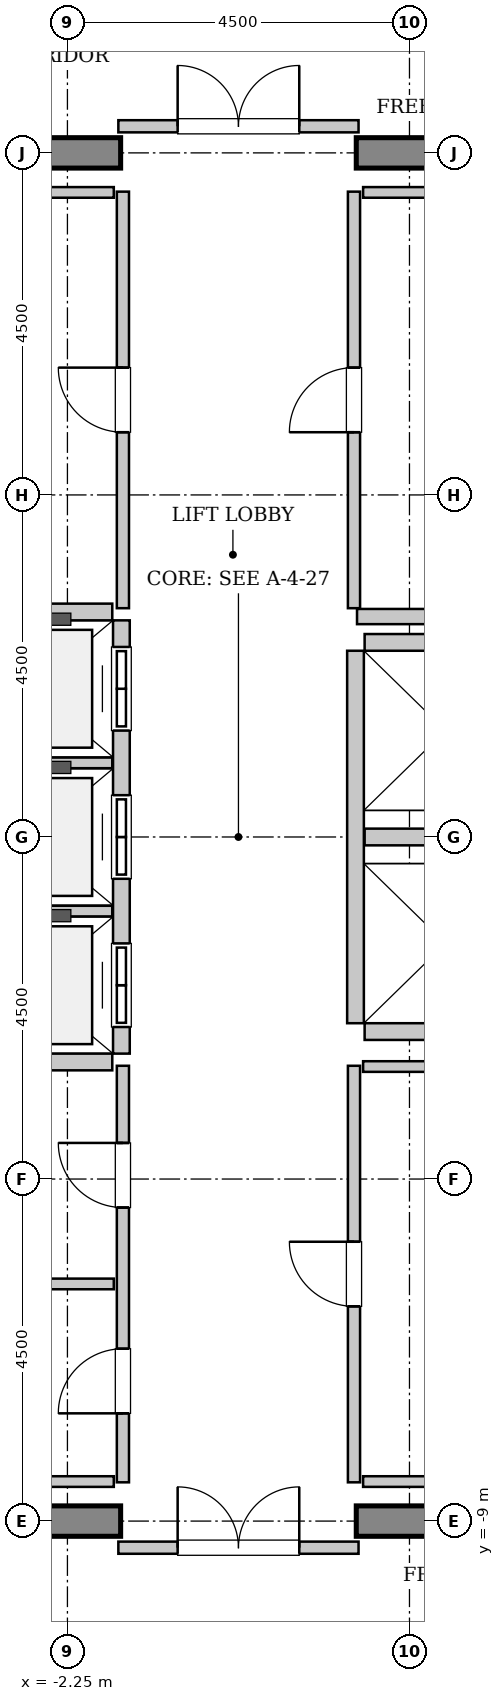
"""IFC4 building model, lengths in metres.
Left out: names, types, materials, properties, quantities, classifications, styles, units other than length and angle.
Written with IfcOpenShell. Run it as: python <this file> out.ifc"""

import sys

from ifc_helpers import new_model, si_unit, direction, frame, frame_2d, origin, place, context, subcontext, project, spatial, rectangle, extrude, source, transform, mapped, element, fill, save


model = new_model("IFC4")
c1 = context("Model", 3, precision=1e-05, world=origin(), true_north=direction((0.0, 1.0)))
c2 = subcontext(c1, "Body", "Model", "MODEL_VIEW")
j1 = project(units=[si_unit("LENGTHUNIT", "METRE"), si_unit("PLANEANGLEUNIT", "RADIAN")], contexts=[c1])
p1 = place(None, origin())
s1 = spatial("IfcSite", under=j1, at=p1, CompositionType="ELEMENT")
p2 = place(p1, origin())
s2 = spatial("IfcBuilding", under=s1, at=p2, CompositionType="ELEMENT")
p3 = place(p2, frame((0.0, 0.0, 326.2)))
s3 = spatial("IfcBuildingStorey", under=s2, at=p3, CompositionType="ELEMENT", Elevation=326.2)
m1 = source(origin(), c2, "Body", "SweptSolid", [
    extrude(rectangle(XDim=9.9, YDim=0.4, at=frame_2d((4.95, 0.0))), origin(), (0.0, 0.0, 1.0), 3.8),
])
for number, where, z_axis, x_axis in (
    (1, (-11.45, 9.0, 0.0), (0.0, 0.0, 1.0), (1.0, 0.0, 0.0)),
    (2, (1.55, 9.0, 0.0), (0.0, 0.0, 1.0), (1.0, 0.0, 0.0)),
    (3, (-11.45, -9.0, 0.0), (0.0, 0.0, 1.0), (1.0, 0.0, 0.0)),
    (4, (1.55, -9.0, 0.0), (0.0, 0.0, 1.0), (1.0, 0.0, 0.0)),
):
    element("IfcWall", number, at=place(p3, frame(where, z_axis=z_axis, x_axis=x_axis)), inside=s3, PredefinedType="SHEAR", context=c2, shape_type="MappedRepresentation", body=[
        mapped(m1, transform((0.0, 0.0, 0.0), x_axis=(1.0, 0.0, 0.0), y_axis=(0.0, 1.0, 0.0), z_axis=(0.0, 0.0, 1.0), scale=1.0)),
    ])
m2 = source(origin(), c2, "Body", "SweptSolid", [
    extrude(rectangle(XDim=5.7, YDim=0.22, at=frame_2d((2.85, 0.0))), origin(), (0.0, 0.0, 1.0), 3.535),
])
p4 = place(p3, frame((-1.54, -2.85, 0.0), z_axis=(0.0, 0.0, 1.0), x_axis=(0.0, 1.0, 0.0)))
e5 = element("IfcWall", 5, at=p4, inside=s3, PredefinedType="SOLIDWALL", context=c2, shape_type="MappedRepresentation", body=[
    mapped(m2, transform((0.0, 0.0, 0.0), x_axis=(1.0, 0.0, 0.0), y_axis=(0.0, 1.0, 0.0), z_axis=(0.0, 0.0, 1.0), scale=1.0)),
])
p5 = place(p4, frame((0.35, 0.0, 0.0)))
e6 = element("IfcOpeningElement", 6, at=p5, cuts=e5, PredefinedType="OPENING", context=c2, shape_type="SweptSolid", body=[
    extrude(rectangle(XDim=1.1, YDim=2.2, at=frame_2d((0.55, 1.1))), frame((0.0, 0.12, 0.0), z_axis=(0.0, -1.0, 0.0), x_axis=(1.0, 0.0, 0.0)), (0.0, 0.0, 1.0), 0.24),
])
p6 = place(p4, frame((2.3, 0.0, 0.0)))
e7 = element("IfcOpeningElement", 7, at=p6, cuts=e5, PredefinedType="OPENING", context=c2, shape_type="SweptSolid", body=[
    extrude(rectangle(XDim=1.1, YDim=2.2, at=frame_2d((0.55, 1.1))), frame((0.0, 0.12, 0.0), z_axis=(0.0, -1.0, 0.0), x_axis=(1.0, 0.0, 0.0)), (0.0, 0.0, 1.0), 0.24),
])
p7 = place(p4, frame((4.25, 0.0, 0.0)))
e8 = element("IfcOpeningElement", 8, at=p7, cuts=e5, PredefinedType="OPENING", context=c2, shape_type="SweptSolid", body=[
    extrude(rectangle(XDim=1.1, YDim=2.2, at=frame_2d((0.55, 1.1))), frame((0.0, 0.12, 0.0), z_axis=(0.0, -1.0, 0.0), x_axis=(1.0, 0.0, 0.0)), (0.0, 0.0, 1.0), 0.24),
])
m3 = source(origin(), c2, "Body", "SweptSolid", [
    extrude(rectangle(XDim=2.13, YDim=0.22, at=frame_2d((1.065, 0.0))), origin(), (0.0, 0.0, 1.0), 3.535),
])
p8 = place(p3, frame((-3.79, -2.96, 0.0), z_axis=(0.0, 0.0, 1.0), x_axis=(1.0, 0.0, 0.0)))
e9 = element("IfcWall", 9, at=p8, inside=s3, PredefinedType="SOLIDWALL", context=c2, shape_type="MappedRepresentation", body=[
    mapped(m3, transform((0.0, 0.0, 0.0), x_axis=(1.0, 0.0, 0.0), y_axis=(0.0, 1.0, 0.0), z_axis=(0.0, 0.0, 1.0), scale=1.0)),
])
m4 = source(origin(), c2, "Body", "SweptSolid", [
    extrude(rectangle(XDim=2.13, YDim=0.14, at=frame_2d((1.065, 0.0))), origin(), (0.0, 0.0, 1.0), 3.535),
])
for number, where, z_axis, x_axis in (
    (10, (-3.79, -0.975, 0.0), (0.0, 0.0, 1.0), (1.0, 0.0, 0.0)),
    (11, (-3.79, 0.975, 0.0), (0.0, 0.0, 1.0), (1.0, 0.0, 0.0)),
):
    element("IfcWall", number, at=place(p3, frame(where, z_axis=z_axis, x_axis=x_axis)), inside=s3, PredefinedType="PARTITIONING", context=c2, shape_type="MappedRepresentation", body=[
        mapped(m4, transform((0.0, 0.0, 0.0), x_axis=(1.0, 0.0, 0.0), y_axis=(0.0, 1.0, 0.0), z_axis=(0.0, 0.0, 1.0), scale=1.0)),
    ])
p9 = place(p3, frame((-1.66, 2.96, 0.0), z_axis=(0.0, 0.0, 1.0), x_axis=(-1.0, 0.0, 0.0)))
e12 = element("IfcWall", 12, at=p9, inside=s3, PredefinedType="SOLIDWALL", context=c2, shape_type="MappedRepresentation", body=[
    mapped(m3, transform((0.0, 0.0, 0.0), x_axis=(1.0, 0.0, 0.0), y_axis=(0.0, 1.0, 0.0), z_axis=(0.0, 0.0, 1.0), scale=1.0)),
])
m5 = source(origin(), c2, "Body", "SweptSolid", [
    extrude(rectangle(XDim=4.9, YDim=0.22, at=frame_2d((2.45, 0.0))), origin(), (0.0, 0.0, 1.0), 3.535),
])
p10 = place(p3, frame((1.54, 2.45, 0.0), z_axis=(0.0, 0.0, 1.0), x_axis=(0.0, -1.0, 0.0)))
e13 = element("IfcWall", 13, at=p10, inside=s3, PredefinedType="SOLIDWALL", context=c2, shape_type="MappedRepresentation", body=[
    mapped(m5, transform((0.0, 0.0, 0.0), x_axis=(1.0, 0.0, 0.0), y_axis=(0.0, 1.0, 0.0), z_axis=(0.0, 0.0, 1.0), scale=1.0)),
])
for number, where, z_axis, x_axis in (
    (14, (1.66, -2.56, 0.0), (0.0, 0.0, 1.0), (1.0, 0.0, 0.0)),
    (15, (1.66, 0.0, 0.0), (0.0, 0.0, 1.0), (1.0, 0.0, 0.0)),
    (16, (3.79, 2.56, 0.0), (0.0, 0.0, 1.0), (-1.0, 0.0, 0.0)),
):
    element("IfcWall", number, at=place(p3, frame(where, z_axis=z_axis, x_axis=x_axis)), inside=s3, PredefinedType="SOLIDWALL", context=c2, shape_type="MappedRepresentation", body=[
        mapped(m3, transform((0.0, 0.0, 0.0), x_axis=(1.0, 0.0, 0.0), y_axis=(0.0, 1.0, 0.0), z_axis=(0.0, 0.0, 1.0), scale=1.0)),
    ])
m6 = source(origin(), c2, "Body", "SweptSolid", [
    extrude(rectangle(XDim=2.52, YDim=0.2, at=frame_2d((1.26, 0.0))), origin(), (0.0, 0.0, 1.0), 3.535),
])
p11 = place(p3, frame((1.56, 2.9, 0.0), z_axis=(0.0, 0.0, 1.0), x_axis=(1.0, 0.0, 0.0)))
e17 = element("IfcWall", 17, at=p11, inside=s3, PredefinedType="PARTITIONING", context=c2, shape_type="MappedRepresentation", body=[
    mapped(m6, transform((0.0, 0.0, 0.0), x_axis=(1.0, 0.0, 0.0), y_axis=(0.0, 1.0, 0.0), z_axis=(0.0, 0.0, 1.0), scale=1.0)),
])
m7 = source(origin(), c2, "Body", "SweptSolid", [
    extrude(rectangle(XDim=3.16, YDim=0.16, at=frame_2d((1.58, 0.0))), origin(), (0.0, 0.0, 1.0), 2.625),
])
p12 = place(p3, frame((-1.58, 9.35, 0.0), z_axis=(0.0, 0.0, 1.0), x_axis=(1.0, 0.0, 0.0)))
e18 = element("IfcWall", 18, at=p12, inside=s3, PredefinedType="PARTITIONING", context=c2, shape_type="MappedRepresentation", body=[
    mapped(m7, transform((0.0, 0.0, 0.0), x_axis=(1.0, 0.0, 0.0), y_axis=(0.0, 1.0, 0.0), z_axis=(0.0, 0.0, 1.0), scale=1.0)),
])
p13 = place(p12, frame((0.78, 0.0, 0.0)))
e19 = element("IfcOpeningElement", 19, at=p13, cuts=e18, PredefinedType="OPENING", context=c2, shape_type="SweptSolid", body=[
    extrude(rectangle(XDim=1.6, YDim=2.3, at=frame_2d((0.8, 1.15))), frame((0.0, 0.09, 0.0), z_axis=(0.0, -1.0, 0.0), x_axis=(1.0, 0.0, 0.0)), (0.0, 0.0, 1.0), 0.18),
])
p14 = place(p3, frame((-1.58, -9.35, 0.0), z_axis=(0.0, 0.0, 1.0), x_axis=(1.0, 0.0, 0.0)))
e20 = element("IfcWall", 20, at=p14, inside=s3, PredefinedType="PARTITIONING", context=c2, shape_type="MappedRepresentation", body=[
    mapped(m7, transform((0.0, 0.0, 0.0), x_axis=(1.0, 0.0, 0.0), y_axis=(0.0, 1.0, 0.0), z_axis=(0.0, 0.0, 1.0), scale=1.0)),
])
p15 = place(p14, frame((0.78, 0.0, 0.0)))
e21 = element("IfcOpeningElement", 21, at=p15, cuts=e20, PredefinedType="OPENING", context=c2, shape_type="SweptSolid", body=[
    extrude(rectangle(XDim=1.6, YDim=2.3, at=frame_2d((0.8, 1.15))), frame((0.0, 0.09, 0.0), z_axis=(0.0, -1.0, 0.0), x_axis=(1.0, 0.0, 0.0)), (0.0, 0.0, 1.0), 0.18),
])
m8 = source(origin(), c2, "Body", "SweptSolid", [
    extrude(rectangle(XDim=5.48, YDim=0.16, at=frame_2d((2.74, 0.0))), origin(), (0.0, 0.0, 1.0), 3.535),
])
p16 = place(p3, frame((-1.52, 3.01, 0.0), z_axis=(0.0, 0.0, 1.0), x_axis=(0.0, 1.0, 0.0)))
e22 = element("IfcWall", 22, at=p16, inside=s3, PredefinedType="PARTITIONING", context=c2, shape_type="MappedRepresentation", body=[
    mapped(m8, transform((0.0, 0.0, 0.0), x_axis=(1.0, 0.0, 0.0), y_axis=(0.0, 1.0, 0.0), z_axis=(0.0, 0.0, 1.0), scale=1.0)),
])
p17 = place(p16, frame((2.315, 0.0, 0.0)))
e23 = element("IfcOpeningElement", 23, at=p17, cuts=e22, PredefinedType="OPENING", context=c2, shape_type="SweptSolid", body=[
    extrude(rectangle(XDim=0.85, YDim=2.1, at=frame_2d((0.425, 1.05))), frame((0.0, 0.09, 0.0), z_axis=(0.0, -1.0, 0.0), x_axis=(1.0, 0.0, 0.0)), (0.0, 0.0, 1.0), 0.18),
])
m9 = source(origin(), c2, "Body", "SweptSolid", [
    extrude(rectangle(XDim=3.15, YDim=0.14, at=frame_2d((1.575, 0.0))), origin(), (0.0, 0.0, 1.0), 3.535),
])
p18 = place(p3, frame((-4.79, 8.48, 0.0), z_axis=(0.0, 0.0, 1.0), x_axis=(1.0, 0.0, 0.0)))
e24 = element("IfcWall", 24, at=p18, inside=s3, PredefinedType="PARTITIONING", context=c2, shape_type="MappedRepresentation", body=[
    mapped(m9, transform((0.0, 0.0, 0.0), x_axis=(1.0, 0.0, 0.0), y_axis=(0.0, 1.0, 0.0), z_axis=(0.0, 0.0, 1.0), scale=1.0)),
])
p19 = place(p3, frame((-1.52, -8.49, 0.0), z_axis=(0.0, 0.0, 1.0), x_axis=(0.0, 1.0, 0.0)))
e25 = element("IfcWall", 25, at=p19, inside=s3, PredefinedType="PARTITIONING", context=c2, shape_type="MappedRepresentation", body=[
    mapped(m8, transform((0.0, 0.0, 0.0), x_axis=(1.0, 0.0, 0.0), y_axis=(0.0, 1.0, 0.0), z_axis=(0.0, 0.0, 1.0), scale=1.0)),
])
p20 = place(p19, frame((0.907, 0.0, 0.0)))
e26 = element("IfcOpeningElement", 26, at=p20, cuts=e25, PredefinedType="OPENING", context=c2, shape_type="SweptSolid", body=[
    extrude(rectangle(XDim=0.85, YDim=2.1, at=frame_2d((0.425, 1.05))), frame((0.0, 0.09, 0.0), z_axis=(0.0, -1.0, 0.0), x_axis=(1.0, 0.0, 0.0)), (0.0, 0.0, 1.0), 0.18),
])
p21 = place(p19, frame((3.615, 0.0, 0.0)))
e27 = element("IfcOpeningElement", 27, at=p21, cuts=e25, PredefinedType="OPENING", context=c2, shape_type="SweptSolid", body=[
    extrude(rectangle(XDim=0.85, YDim=2.1, at=frame_2d((0.425, 1.05))), frame((0.0, 0.09, 0.0), z_axis=(0.0, -1.0, 0.0), x_axis=(1.0, 0.0, 0.0)), (0.0, 0.0, 1.0), 0.18),
])
m10 = source(origin(), c2, "Body", "SweptSolid", [
    extrude(rectangle(XDim=5.55, YDim=0.14, at=frame_2d((2.775, 0.0))), origin(), (0.0, 0.0, 1.0), 3.535),
])
p22 = place(p3, frame((-7.19, -5.88, 0.0), z_axis=(0.0, 0.0, 1.0), x_axis=(1.0, 0.0, 0.0)))
e28 = element("IfcWall", 28, at=p22, inside=s3, PredefinedType="PARTITIONING", context=c2, shape_type="MappedRepresentation", body=[
    mapped(m10, transform((0.0, 0.0, 0.0), x_axis=(1.0, 0.0, 0.0), y_axis=(0.0, 1.0, 0.0), z_axis=(0.0, 0.0, 1.0), scale=1.0)),
])
p23 = place(p3, frame((1.52, 3.01, 0.0), z_axis=(0.0, 0.0, 1.0), x_axis=(0.0, 1.0, 0.0)))
e29 = element("IfcWall", 29, at=p23, inside=s3, PredefinedType="PARTITIONING", context=c2, shape_type="MappedRepresentation", body=[
    mapped(m8, transform((0.0, 0.0, 0.0), x_axis=(1.0, 0.0, 0.0), y_axis=(0.0, 1.0, 0.0), z_axis=(0.0, 0.0, 1.0), scale=1.0)),
])
p24 = place(p23, frame((2.315, 0.0, 0.0)))
e30 = element("IfcOpeningElement", 30, at=p24, cuts=e29, PredefinedType="OPENING", context=c2, shape_type="SweptSolid", body=[
    extrude(rectangle(XDim=0.85, YDim=2.1, at=frame_2d((0.425, 1.05))), frame((0.0, 0.09, 0.0), z_axis=(0.0, -1.0, 0.0), x_axis=(1.0, 0.0, 0.0)), (0.0, 0.0, 1.0), 0.18),
])
for number, where, z_axis, x_axis in (
    (31, (1.64, 8.48, 0.0), (0.0, 0.0, 1.0), (1.0, 0.0, 0.0)),
    (32, (-4.79, -8.48, 0.0), (0.0, 0.0, 1.0), (1.0, 0.0, 0.0)),
):
    element("IfcWall", number, at=place(p3, frame(where, z_axis=z_axis, x_axis=x_axis)), inside=s3, PredefinedType="PARTITIONING", context=c2, shape_type="MappedRepresentation", body=[
        mapped(m9, transform((0.0, 0.0, 0.0), x_axis=(1.0, 0.0, 0.0), y_axis=(0.0, 1.0, 0.0), z_axis=(0.0, 0.0, 1.0), scale=1.0)),
    ])
p25 = place(p3, frame((1.52, -8.49, 0.0), z_axis=(0.0, 0.0, 1.0), x_axis=(0.0, 1.0, 0.0)))
e33 = element("IfcWall", 33, at=p25, inside=s3, PredefinedType="PARTITIONING", context=c2, shape_type="MappedRepresentation", body=[
    mapped(m8, transform((0.0, 0.0, 0.0), x_axis=(1.0, 0.0, 0.0), y_axis=(0.0, 1.0, 0.0), z_axis=(0.0, 0.0, 1.0), scale=1.0)),
])
p26 = place(p25, frame((2.315, 0.0, 0.0)))
e34 = element("IfcOpeningElement", 34, at=p26, cuts=e33, PredefinedType="OPENING", context=c2, shape_type="SweptSolid", body=[
    extrude(rectangle(XDim=0.85, YDim=2.1, at=frame_2d((0.425, 1.05))), frame((0.0, 0.09, 0.0), z_axis=(0.0, -1.0, 0.0), x_axis=(1.0, 0.0, 0.0)), (0.0, 0.0, 1.0), 0.18),
])
for number, where, z_axis, x_axis in (
    (35, (1.64, -3.02, 0.0), (0.0, 0.0, 1.0), (1.0, 0.0, 0.0)),
    (36, (1.64, -8.48, 0.0), (0.0, 0.0, 1.0), (1.0, 0.0, 0.0)),
):
    element("IfcWall", number, at=place(p3, frame(where, z_axis=z_axis, x_axis=x_axis)), inside=s3, PredefinedType="PARTITIONING", context=c2, shape_type="MappedRepresentation", body=[
        mapped(m9, transform((0.0, 0.0, 0.0), x_axis=(1.0, 0.0, 0.0), y_axis=(0.0, 1.0, 0.0), z_axis=(0.0, 0.0, 1.0), scale=1.0)),
    ])
m11 = source(origin(), c2, "Body", "SweptSolid", [
    extrude(rectangle(XDim=1.1, YDim=2.2, at=frame_2d((0.55, 1.1))), frame((0.0, 0.025, 0.0), z_axis=(0.0, -1.0, 0.0), x_axis=(1.0, 0.0, 0.0)), (0.0, 0.0, 1.0), 0.05),
])
p27 = place(p5, origin())
e37 = element("IfcDoor", 37, at=p27, inside=s3, OperationType="DOUBLE_DOOR_SLIDING", PredefinedType="DOOR", context=c2, shape_type="MappedRepresentation", body=[
    mapped(m11, transform((0.0, 0.0, 0.0), x_axis=(1.0, 0.0, 0.0), y_axis=(0.0, 1.0, 0.0), z_axis=(0.0, 0.0, 1.0), scale=1.0)),
])
fill(e6, e37)
p28 = place(p6, origin())
e38 = element("IfcDoor", 38, at=p28, inside=s3, OperationType="DOUBLE_DOOR_SLIDING", PredefinedType="DOOR", context=c2, shape_type="MappedRepresentation", body=[
    mapped(m11, transform((0.0, 0.0, 0.0), x_axis=(1.0, 0.0, 0.0), y_axis=(0.0, 1.0, 0.0), z_axis=(0.0, 0.0, 1.0), scale=1.0)),
])
fill(e7, e38)
p29 = place(p7, origin())
e39 = element("IfcDoor", 39, at=p29, inside=s3, OperationType="DOUBLE_DOOR_SLIDING", PredefinedType="DOOR", context=c2, shape_type="MappedRepresentation", body=[
    mapped(m11, transform((0.0, 0.0, 0.0), x_axis=(1.0, 0.0, 0.0), y_axis=(0.0, 1.0, 0.0), z_axis=(0.0, 0.0, 1.0), scale=1.0)),
])
fill(e8, e39)
m12 = source(origin(), c2, "Body", "SweptSolid", [
    extrude(rectangle(XDim=1.6, YDim=2.3, at=frame_2d((0.8, 1.15))), frame((0.0, 0.025, 0.0), z_axis=(0.0, -1.0, 0.0), x_axis=(1.0, 0.0, 0.0)), (0.0, 0.0, 1.0), 0.05),
])
p30 = place(p13, origin())
e40 = element("IfcDoor", 40, at=p30, inside=s3, OperationType="DOUBLE_DOOR_SINGLE_SWING", PredefinedType="DOOR", context=c2, shape_type="MappedRepresentation", body=[
    mapped(m12, transform((0.0, 0.0, 0.0), x_axis=(1.0, 0.0, 0.0), y_axis=(0.0, 1.0, 0.0), z_axis=(0.0, 0.0, 1.0), scale=1.0)),
])
fill(e19, e40)
p31 = place(p15, origin())
e41 = element("IfcDoor", 41, at=p31, inside=s3, OperationType="DOUBLE_DOOR_SINGLE_SWING", PredefinedType="DOOR", context=c2, shape_type="MappedRepresentation", body=[
    mapped(m12, transform((0.0, 0.0, 0.0), x_axis=(1.0, 0.0, 0.0), y_axis=(0.0, 1.0, 0.0), z_axis=(0.0, 0.0, 1.0), scale=1.0)),
])
fill(e21, e41)
m13 = source(origin(), c2, "Body", "SweptSolid", [
    extrude(rectangle(XDim=0.85, YDim=2.1, at=frame_2d((0.425, 1.05))), frame((0.0, 0.025, 0.0), z_axis=(0.0, -1.0, 0.0), x_axis=(1.0, 0.0, 0.0)), (0.0, 0.0, 1.0), 0.05),
])
p32 = place(p17, origin())
e42 = element("IfcDoor", 42, at=p32, inside=s3, OperationType="SINGLE_SWING_RIGHT", PredefinedType="DOOR", context=c2, shape_type="MappedRepresentation", body=[
    mapped(m13, transform((0.0, 0.0, 0.0), x_axis=(1.0, 0.0, 0.0), y_axis=(0.0, 1.0, 0.0), z_axis=(0.0, 0.0, 1.0), scale=1.0)),
])
fill(e23, e42)
p33 = place(p20, origin())
e43 = element("IfcDoor", 43, at=p33, inside=s3, OperationType="SINGLE_SWING_LEFT", PredefinedType="DOOR", context=c2, shape_type="MappedRepresentation", body=[
    mapped(m13, transform((0.0, 0.0, 0.0), x_axis=(1.0, 0.0, 0.0), y_axis=(0.0, 1.0, 0.0), z_axis=(0.0, 0.0, 1.0), scale=1.0)),
])
fill(e26, e43)
p34 = place(p21, origin())
e44 = element("IfcDoor", 44, at=p34, inside=s3, OperationType="SINGLE_SWING_RIGHT", PredefinedType="DOOR", context=c2, shape_type="MappedRepresentation", body=[
    mapped(m13, transform((0.0, 0.0, 0.0), x_axis=(1.0, 0.0, 0.0), y_axis=(0.0, 1.0, 0.0), z_axis=(0.0, 0.0, 1.0), scale=1.0)),
])
fill(e27, e44)
p35 = place(p24, origin())
e45 = element("IfcDoor", 45, at=p35, inside=s3, OperationType="SINGLE_SWING_LEFT", PredefinedType="DOOR", context=c2, shape_type="MappedRepresentation", body=[
    mapped(m13, transform((0.0, 0.0, 0.0), x_axis=(1.0, 0.0, 0.0), y_axis=(0.0, 1.0, 0.0), z_axis=(0.0, 0.0, 1.0), scale=1.0)),
])
fill(e30, e45)
p36 = place(p26, origin())
e46 = element("IfcDoor", 46, at=p36, inside=s3, OperationType="SINGLE_SWING_RIGHT", PredefinedType="DOOR", context=c2, shape_type="MappedRepresentation", body=[
    mapped(m13, transform((0.0, 0.0, 0.0), x_axis=(1.0, 0.0, 0.0), y_axis=(0.0, 1.0, 0.0), z_axis=(0.0, 0.0, 1.0), scale=1.0)),
])
fill(e34, e46)
save(model, sys.argv[1])
